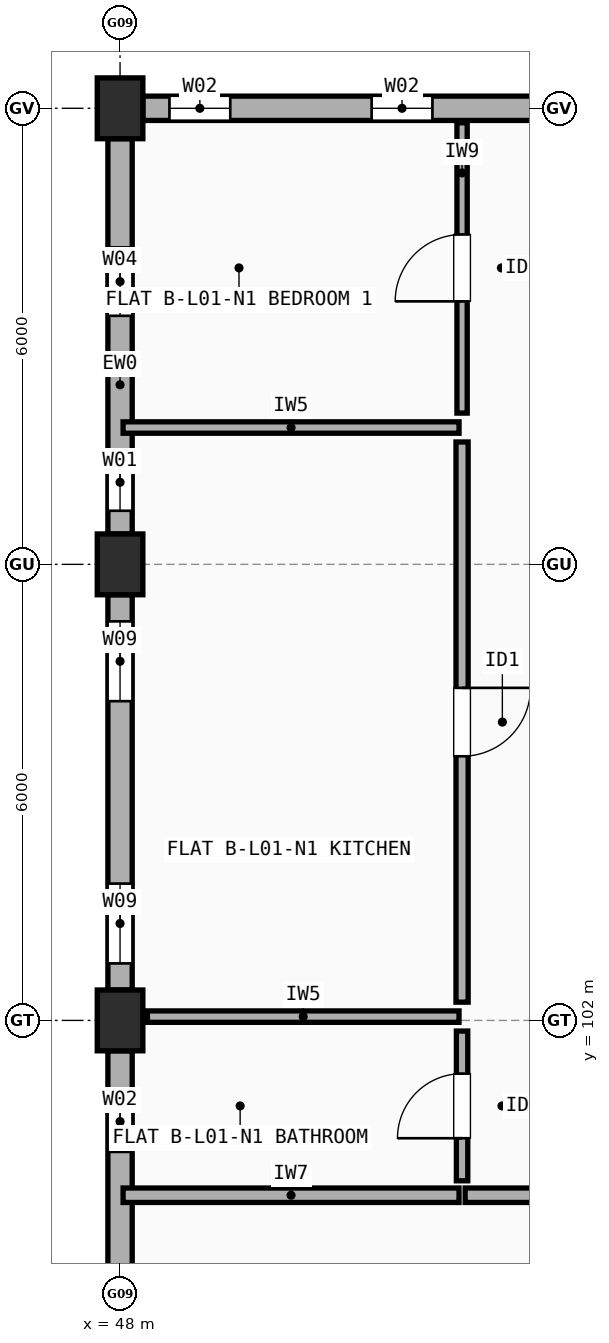
"""IFC4 building model, lengths in metres.
Left out: names, types, materials, properties, quantities, classifications, styles, units other than length and angle.
Written with IfcOpenShell. Run it as: python <this file> out.ifc"""

import sys

from ifc_helpers import new_model, si_unit, direction, frame, frame_2d, origin, origin_2d, place, context, subcontext, project, spatial, rectangle, extrude, element, fill, save


model = new_model("IFC4")
c1 = context("Model", 3, precision=1e-05, world=origin(), true_north=direction((0.0, 1.0)))
c2 = subcontext(c1, "Body", "Model", "MODEL_VIEW")
j1 = project(units=[si_unit("LENGTHUNIT", "METRE"), si_unit("PLANEANGLEUNIT", "RADIAN")], contexts=[c1])
p1 = place(None, origin())
s1 = spatial("IfcSite", under=j1, at=p1, CompositionType="ELEMENT")
p2 = place(p1, origin())
s2 = spatial("IfcBuilding", under=s1, at=p2, CompositionType="ELEMENT")
p3 = place(p2, frame((0.0, 0.0, 4.5)))
s3 = spatial("IfcBuildingStorey", under=s2, at=p3, CompositionType="ELEMENT", Elevation=4.5)
for number, where, z_axis, x_axis in (
    (1, (48.0, 102.0, 0.0), (0.0, 0.0, 1.0), (1.0, 0.0, 0.0)),
    (2, (48.0, 108.0, 0.0), (0.0, 0.0, 1.0), (1.0, 0.0, 0.0)),
    (3, (48.0, 114.0, 0.0), (0.0, 0.0, 1.0), (1.0, 0.0, 0.0)),
):
    element("IfcColumn", number, at=place(p3, frame(where, z_axis=z_axis, x_axis=x_axis)), inside=s3, PredefinedType="COLUMN", context=c2, shape_type="SweptSolid", body=[
        extrude(rectangle(XDim=0.6, YDim=0.8, at=origin_2d()), origin(), (0.0, 0.0, 1.0), 2.945),
    ])
p4 = place(p3, frame((53.65, 114.0, 0.0), z_axis=(0.0, 0.0, 1.0), x_axis=(-1.0, 0.0, 0.0)))
e4 = element("IfcWall", 4, at=p4, inside=s3, PredefinedType="STANDARD", context=c2, shape_type="SweptSolid", body=[
    extrude(rectangle(XDim=5.35, YDim=0.32, at=frame_2d((2.675, 0.0))), origin(), (0.0, 0.0, 1.0), 2.427),
])
p5 = place(p4, frame((1.54, 0.0, 0.9)))
e5 = element("IfcOpeningElement", 5, at=p5, cuts=e4, PredefinedType="OPENING", context=c2, shape_type="SweptSolid", body=[
    extrude(rectangle(XDim=0.8, YDim=1.2, at=frame_2d((0.4, 0.6))), frame((0.0, 0.17, 0.0), z_axis=(0.0, -1.0, 0.0), x_axis=(1.0, 0.0, 0.0)), (0.0, 0.0, 1.0), 0.34),
])
p6 = place(p4, frame((4.2, 0.0, 0.9)))
e6 = element("IfcOpeningElement", 6, at=p6, cuts=e4, PredefinedType="OPENING", context=c2, shape_type="SweptSolid", body=[
    extrude(rectangle(XDim=0.8, YDim=1.2, at=frame_2d((0.4, 0.6))), frame((0.0, 0.17, 0.0), z_axis=(0.0, -1.0, 0.0), x_axis=(1.0, 0.0, 0.0)), (0.0, 0.0, 1.0), 0.34),
])
p7 = place(p3, frame((48.0, 113.6, 0.0), z_axis=(0.0, 0.0, 1.0), x_axis=(0.0, -1.0, 0.0)))
e7 = element("IfcWall", 7, at=p7, inside=s3, PredefinedType="STANDARD", context=c2, shape_type="SweptSolid", body=[
    extrude(rectangle(XDim=5.2, YDim=0.32, at=frame_2d((2.6, 0.0))), origin(), (0.0, 0.0, 1.0), 2.427),
])
p8 = place(p7, frame((1.43, 0.0, 0.9)))
e8 = element("IfcOpeningElement", 8, at=p8, cuts=e7, PredefinedType="OPENING", context=c2, shape_type="SweptSolid", body=[
    extrude(rectangle(XDim=0.9, YDim=1.3, at=frame_2d((0.45, 0.65))), frame((0.0, 0.17, 0.0), z_axis=(0.0, -1.0, 0.0), x_axis=(1.0, 0.0, 0.0)), (0.0, 0.0, 1.0), 0.34),
])
p9 = place(p7, frame((4.145, 0.0, 0.9)))
e9 = element("IfcOpeningElement", 9, at=p9, cuts=e7, PredefinedType="OPENING", context=c2, shape_type="SweptSolid", body=[
    extrude(rectangle(XDim=0.75, YDim=1.15, at=frame_2d((0.375, 0.575))), frame((0.0, 0.17, 0.0), z_axis=(0.0, -1.0, 0.0), x_axis=(1.0, 0.0, 0.0)), (0.0, 0.0, 1.0), 0.34),
])
p10 = place(p3, frame((48.0, 107.6, 0.0), z_axis=(0.0, 0.0, 1.0), x_axis=(0.0, -1.0, 0.0)))
e10 = element("IfcWall", 10, at=p10, inside=s3, PredefinedType="STANDARD", context=c2, shape_type="SweptSolid", body=[
    extrude(rectangle(XDim=5.2, YDim=0.32, at=frame_2d((2.6, 0.0))), origin(), (0.0, 0.0, 1.0), 2.427),
])
p11 = place(p10, frame((0.35, 0.0, 0.9)))
e11 = element("IfcOpeningElement", 11, at=p11, cuts=e10, PredefinedType="OPENING", context=c2, shape_type="SweptSolid", body=[
    extrude(rectangle(XDim=1.05, YDim=1.35, at=frame_2d((0.525, 0.675))), frame((0.0, 0.17, 0.0), z_axis=(0.0, -1.0, 0.0), x_axis=(1.0, 0.0, 0.0)), (0.0, 0.0, 1.0), 0.34),
])
p12 = place(p10, frame((3.8, 0.0, 0.9)))
e12 = element("IfcOpeningElement", 12, at=p12, cuts=e10, PredefinedType="OPENING", context=c2, shape_type="SweptSolid", body=[
    extrude(rectangle(XDim=1.05, YDim=1.35, at=frame_2d((0.525, 0.675))), frame((0.0, 0.17, 0.0), z_axis=(0.0, -1.0, 0.0), x_axis=(1.0, 0.0, 0.0)), (0.0, 0.0, 1.0), 0.34),
])
p13 = place(p3, frame((48.0, 101.6, 0.0), z_axis=(0.0, 0.0, 1.0), x_axis=(0.0, -1.0, 0.0)))
e13 = element("IfcWall", 13, at=p13, inside=s3, PredefinedType="STANDARD", context=c2, shape_type="SweptSolid", body=[
    extrude(rectangle(XDim=5.2, YDim=0.32, at=frame_2d((2.6, 0.0))), origin(), (0.0, 0.0, 1.0), 2.427),
])
p14 = place(p13, frame((0.53, 0.0, 0.9)))
e14 = element("IfcOpeningElement", 14, at=p14, cuts=e13, PredefinedType="OPENING", context=c2, shape_type="SweptSolid", body=[
    extrude(rectangle(XDim=0.8, YDim=1.2, at=frame_2d((0.4, 0.6))), frame((0.0, 0.17, 0.0), z_axis=(0.0, -1.0, 0.0), x_axis=(1.0, 0.0, 0.0)), (0.0, 0.0, 1.0), 0.34),
])
p15 = place(p13, frame((3.145, 0.0, 0.9)))
e15 = element("IfcOpeningElement", 15, at=p15, cuts=e13, PredefinedType="OPENING", context=c2, shape_type="SweptSolid", body=[
    extrude(rectangle(XDim=0.85, YDim=1.25, at=frame_2d((0.425, 0.625))), frame((0.0, 0.17, 0.0), z_axis=(0.0, -1.0, 0.0), x_axis=(1.0, 0.0, 0.0)), (0.0, 0.0, 1.0), 0.34),
])
p16 = place(p3, frame((48.04, 99.7, 0.0), z_axis=(0.0, 0.0, 1.0), x_axis=(1.0, 0.0, 0.0)))
e16 = element("IfcWall", 16, at=p16, inside=s3, PredefinedType="SOLIDWALL", context=c2, shape_type="SweptSolid", body=[
    extrude(rectangle(XDim=4.42, YDim=0.19, at=frame_2d((2.21, 0.0))), origin(), (0.0, 0.0, 1.0), 2.427),
])
p17 = place(p3, frame((52.54, 99.7, 0.0), z_axis=(0.0, 0.0, 1.0), x_axis=(1.0, 0.0, 0.0)))
e17 = element("IfcWall", 17, at=p17, inside=s3, PredefinedType="SOLIDWALL", context=c2, shape_type="SweptSolid", body=[
    extrude(rectangle(XDim=10.42, YDim=0.19, at=frame_2d((5.21, 0.0))), origin(), (0.0, 0.0, 1.0), 2.508),
])
p18 = place(p17, frame((4.685, 0.0, 0.0)))
e18 = element("IfcOpeningElement", 18, at=p18, cuts=e17, PredefinedType="OPENING", context=c2, shape_type="SweptSolid", body=[
    extrude(rectangle(XDim=1.05, YDim=2.15, at=frame_2d((0.525, 1.075))), frame((0.0, 0.105, 0.0), z_axis=(0.0, -1.0, 0.0), x_axis=(1.0, 0.0, 0.0)), (0.0, 0.0, 1.0), 0.21),
])
p19 = place(p3, frame((52.5, 109.99, 0.0), z_axis=(0.0, 0.0, 1.0), x_axis=(0.0, 1.0, 0.0)))
e19 = element("IfcWall", 19, at=p19, inside=s3, PredefinedType="PARTITIONING", context=c2, shape_type="SweptSolid", body=[
    extrude(rectangle(XDim=3.82, YDim=0.135, at=frame_2d((1.91, 0.0))), origin(), (0.0, 0.0, 1.0), 2.945),
])
p20 = place(p19, frame((1.47, 0.0, 0.0)))
e20 = element("IfcOpeningElement", 20, at=p20, cuts=e19, PredefinedType="OPENING", context=c2, shape_type="SweptSolid", body=[
    extrude(rectangle(XDim=0.88, YDim=2.1, at=frame_2d((0.44, 1.05))), frame((0.0, 0.077, 0.0), z_axis=(0.0, -1.0, 0.0), x_axis=(1.0, 0.0, 0.0)), (0.0, 0.0, 1.0), 0.155),
])
p21 = place(p3, frame((52.5, 102.24, 0.0), z_axis=(0.0, 0.0, 1.0), x_axis=(0.0, 1.0, 0.0)))
e21 = element("IfcWall", 21, at=p21, inside=s3, PredefinedType="PLUMBINGWALL", context=c2, shape_type="SweptSolid", body=[
    extrude(rectangle(XDim=7.37, YDim=0.16, at=frame_2d((3.685, 0.0))), origin(), (0.0, 0.0, 1.0), 2.427),
])
p22 = place(p21, frame((3.235, 0.0, 0.0)))
e22 = element("IfcOpeningElement", 22, at=p22, cuts=e21, PredefinedType="OPENING", context=c2, shape_type="SweptSolid", body=[
    extrude(rectangle(XDim=0.9, YDim=2.1, at=frame_2d((0.45, 1.05))), frame((0.0, 0.09, 0.0), z_axis=(0.0, -1.0, 0.0), x_axis=(1.0, 0.0, 0.0)), (0.0, 0.0, 1.0), 0.18),
])
p23 = place(p3, frame((52.5, 99.89, 0.0), z_axis=(0.0, 0.0, 1.0), x_axis=(0.0, 1.0, 0.0)))
e23 = element("IfcWall", 23, at=p23, inside=s3, PredefinedType="PARTITIONING", context=c2, shape_type="SweptSolid", body=[
    extrude(rectangle(XDim=1.97, YDim=0.15, at=frame_2d((0.985, 0.0))), origin(), (0.0, 0.0, 1.0), 2.945),
])
p24 = place(p23, frame((0.56, 0.0, 0.0)))
e24 = element("IfcOpeningElement", 24, at=p24, cuts=e23, PredefinedType="OPENING", context=c2, shape_type="SweptSolid", body=[
    extrude(rectangle(XDim=0.85, YDim=2.1, at=frame_2d((0.425, 1.05))), frame((0.0, 0.085, 0.0), z_axis=(0.0, -1.0, 0.0), x_axis=(1.0, 0.0, 0.0)), (0.0, 0.0, 1.0), 0.17),
])
p25 = place(p3, frame((48.04, 109.8, 0.0), z_axis=(0.0, 0.0, 1.0), x_axis=(1.0, 0.0, 0.0)))
e25 = element("IfcWall", 25, at=p25, inside=s3, PredefinedType="PARTITIONING", context=c2, shape_type="SweptSolid", body=[
    extrude(rectangle(XDim=4.42, YDim=0.15, at=frame_2d((2.21, 0.0))), origin(), (0.0, 0.0, 1.0), 2.427),
])
p26 = place(p3, frame((48.36, 102.05, 0.0), z_axis=(0.0, 0.0, 1.0), x_axis=(1.0, 0.0, 0.0)))
e26 = element("IfcWall", 26, at=p26, inside=s3, PredefinedType="PARTITIONING", context=c2, shape_type="SweptSolid", body=[
    extrude(rectangle(XDim=4.1, YDim=0.15, at=frame_2d((2.05, 0.0))), origin(), (0.0, 0.0, 1.0), 2.427),
])
p27 = place(p5, origin())
e27 = element("IfcWindow", 27, at=p27, inside=s3, PartitioningType="SINGLE_PANEL", PredefinedType="WINDOW", context=c2, shape_type="SweptSolid", body=[
    extrude(rectangle(XDim=0.8, YDim=1.2, at=frame_2d((0.4, 0.6))), frame((0.0, 0.03, 0.0), z_axis=(0.0, -1.0, 0.0), x_axis=(1.0, 0.0, 0.0)), (0.0, 0.0, 1.0), 0.06),
])
fill(e5, e27)
p28 = place(p6, origin())
e28 = element("IfcWindow", 28, at=p28, inside=s3, PartitioningType="SINGLE_PANEL", PredefinedType="WINDOW", context=c2, shape_type="SweptSolid", body=[
    extrude(rectangle(XDim=0.8, YDim=1.2, at=frame_2d((0.4, 0.6))), frame((0.0, 0.03, 0.0), z_axis=(0.0, -1.0, 0.0), x_axis=(1.0, 0.0, 0.0)), (0.0, 0.0, 1.0), 0.06),
])
fill(e6, e28)
p29 = place(p8, origin())
e29 = element("IfcWindow", 29, at=p29, inside=s3, PartitioningType="SINGLE_PANEL", PredefinedType="WINDOW", context=c2, shape_type="SweptSolid", body=[
    extrude(rectangle(XDim=0.9, YDim=1.3, at=frame_2d((0.45, 0.65))), frame((0.0, 0.03, 0.0), z_axis=(0.0, -1.0, 0.0), x_axis=(1.0, 0.0, 0.0)), (0.0, 0.0, 1.0), 0.06),
])
fill(e8, e29)
p30 = place(p9, origin())
e30 = element("IfcWindow", 30, at=p30, inside=s3, PartitioningType="SINGLE_PANEL", PredefinedType="WINDOW", context=c2, shape_type="SweptSolid", body=[
    extrude(rectangle(XDim=0.75, YDim=1.15, at=frame_2d((0.375, 0.575))), frame((0.0, 0.03, 0.0), z_axis=(0.0, -1.0, 0.0), x_axis=(1.0, 0.0, 0.0)), (0.0, 0.0, 1.0), 0.06),
])
fill(e9, e30)
p31 = place(p11, origin())
e31 = element("IfcWindow", 31, at=p31, inside=s3, PartitioningType="SINGLE_PANEL", PredefinedType="WINDOW", context=c2, shape_type="SweptSolid", body=[
    extrude(rectangle(XDim=1.05, YDim=1.35, at=frame_2d((0.525, 0.675))), frame((0.0, 0.03, 0.0), z_axis=(0.0, -1.0, 0.0), x_axis=(1.0, 0.0, 0.0)), (0.0, 0.0, 1.0), 0.06),
])
fill(e11, e31)
p32 = place(p12, origin())
e32 = element("IfcWindow", 32, at=p32, inside=s3, PartitioningType="SINGLE_PANEL", PredefinedType="WINDOW", context=c2, shape_type="SweptSolid", body=[
    extrude(rectangle(XDim=1.05, YDim=1.35, at=frame_2d((0.525, 0.675))), frame((0.0, 0.03, 0.0), z_axis=(0.0, -1.0, 0.0), x_axis=(1.0, 0.0, 0.0)), (0.0, 0.0, 1.0), 0.06),
])
fill(e12, e32)
p33 = place(p14, origin())
e33 = element("IfcWindow", 33, at=p33, inside=s3, PartitioningType="SINGLE_PANEL", PredefinedType="WINDOW", context=c2, shape_type="SweptSolid", body=[
    extrude(rectangle(XDim=0.8, YDim=1.2, at=frame_2d((0.4, 0.6))), frame((0.0, 0.03, 0.0), z_axis=(0.0, -1.0, 0.0), x_axis=(1.0, 0.0, 0.0)), (0.0, 0.0, 1.0), 0.06),
])
fill(e14, e33)
p34 = place(p20, origin())
e34 = element("IfcDoor", 34, at=p34, inside=s3, OperationType="SINGLE_SWING_LEFT", PredefinedType="DOOR", context=c2, shape_type="SweptSolid", body=[
    extrude(rectangle(XDim=0.88, YDim=2.1, at=frame_2d((0.44, 1.05))), frame((0.0, 0.025, 0.0), z_axis=(0.0, -1.0, 0.0), x_axis=(1.0, 0.0, 0.0)), (0.0, 0.0, 1.0), 0.05),
])
fill(e20, e34)
p35 = place(p22, origin())
e35 = element("IfcDoor", 35, at=p35, inside=s3, OperationType="SINGLE_SWING_RIGHT", PredefinedType="DOOR", context=c2, shape_type="SweptSolid", body=[
    extrude(rectangle(XDim=0.9, YDim=2.1, at=frame_2d((0.45, 1.05))), frame((0.0, 0.025, 0.0), z_axis=(0.0, -1.0, 0.0), x_axis=(1.0, 0.0, 0.0)), (0.0, 0.0, 1.0), 0.05),
])
fill(e22, e35)
p36 = place(p24, origin())
e36 = element("IfcDoor", 36, at=p36, inside=s3, OperationType="SINGLE_SWING_LEFT", PredefinedType="DOOR", context=c2, shape_type="SweptSolid", body=[
    extrude(rectangle(XDim=0.85, YDim=2.1, at=frame_2d((0.425, 1.05))), frame((0.0, 0.025, 0.0), z_axis=(0.0, -1.0, 0.0), x_axis=(1.0, 0.0, 0.0)), (0.0, 0.0, 1.0), 0.05),
])
fill(e24, e36)
save(model, sys.argv[1])
